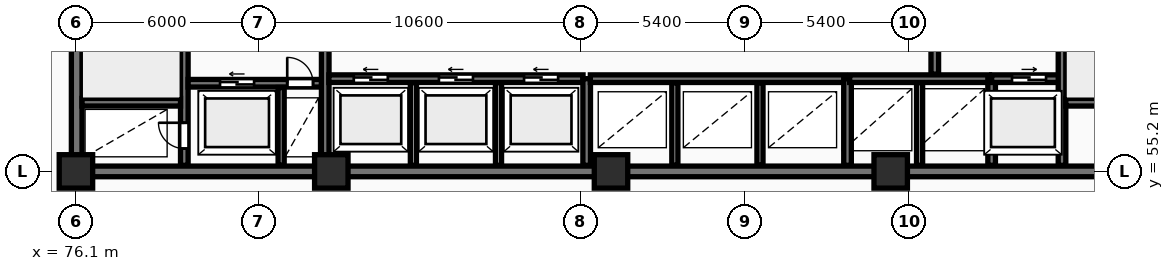
"""IFC4 building model, lengths in metres.
Left out: names, types, materials, properties, quantities, classifications, styles, units other than length and angle.
Written with IfcOpenShell. Run it as: python <this file> out.ifc"""

import sys

from ifc_helpers import new_model, si_unit, direction, frame, frame_2d, origin, origin_2d, place, context, subcontext, project, spatial, rectangle, extrude, element, fill, save


model = new_model("IFC4")
c1 = context("Model", 3, precision=1e-05, world=origin(), true_north=direction((0.0, 1.0)))
c2 = subcontext(c1, "Body", "Model", "MODEL_VIEW")
j1 = project(units=[si_unit("LENGTHUNIT", "METRE"), si_unit("PLANEANGLEUNIT", "RADIAN")], contexts=[c1])
p1 = place(None, origin())
s1 = spatial("IfcSite", under=j1, at=p1, CompositionType="ELEMENT")
p2 = place(p1, origin())
s2 = spatial("IfcBuilding", under=s1, at=p2, CompositionType="ELEMENT")
p3 = place(p2, frame((0.0, 0.0, 19.0)))
s3 = spatial("IfcBuildingStorey", under=s2, at=p3, CompositionType="ELEMENT", Elevation=19.0)
for number, where, z_axis, x_axis in (
    (1, (76.1, 55.2, 0.0), (0.0, 0.0, 1.0), (1.0, 0.0, 0.0)),
    (2, (84.5, 55.2, 0.0), (0.0, 0.0, 1.0), (1.0, 0.0, 0.0)),
    (3, (93.7, 55.2, 0.0), (0.0, 0.0, 1.0), (1.0, 0.0, 0.0)),
    (4, (102.9, 55.2, 0.0), (0.0, 0.0, 1.0), (1.0, 0.0, 0.0)),
):
    element("IfcColumn", number, at=place(p3, frame(where, z_axis=z_axis, x_axis=x_axis)), inside=s3, PredefinedType="COLUMN", context=c2, shape_type="SweptSolid", body=[
        extrude(rectangle(XDim=1.1, YDim=1.1, at=origin_2d()), origin(), (0.0, 0.0, 1.0), 5.0),
    ])
p4 = place(p3, frame((75.95, 55.2, 0.0), z_axis=(0.0, 0.0, 1.0), x_axis=(1.0, 0.0, 0.0)))
e5 = element("IfcWall", 5, at=p4, inside=s3, PredefinedType="SHEAR", context=c2, shape_type="SweptSolid", body=[
    extrude(rectangle(XDim=36.3, YDim=0.35, at=frame_2d((18.15, 0.0))), origin(), (0.0, 0.0, 1.0), 5.0),
])
p5 = place(p3, frame((76.125, 55.375, 0.0), z_axis=(0.0, 0.0, 1.0), x_axis=(0.0, 1.0, 0.0)))
e6 = element("IfcWall", 6, at=p5, inside=s3, PredefinedType="SHEAR", context=c2, shape_type="SweptSolid", body=[
    extrude(rectangle(XDim=11.65, YDim=0.35, at=frame_2d((5.825, 0.0))), origin(), (0.0, 0.0, 1.0), 5.0),
])
p6 = place(p3, frame((79.665, 55.4, 0.0), z_axis=(0.0, 0.0, 1.0), x_axis=(0.0, 1.0, 0.0)))
e7 = element("IfcWall", 7, at=p6, inside=s3, PredefinedType="SHEAR", context=c2, shape_type="SweptSolid", body=[
    extrude(rectangle(XDim=11.6, YDim=0.25, at=frame_2d((5.8, 0.0))), origin(), (0.0, 0.0, 1.0), 5.0),
])
p7 = place(p6, frame((0.55, 0.0, 0.0)))
e8 = element("IfcOpeningElement", 8, at=p7, cuts=e7, PredefinedType="OPENING", context=c2, shape_type="SweptSolid", body=[
    extrude(rectangle(XDim=0.85, YDim=2.05, at=frame_2d((0.425, 1.025))), frame((0.0, 0.135, 0.0), z_axis=(0.0, -1.0, 0.0), x_axis=(1.0, 0.0, 0.0)), (0.0, 0.0, 1.0), 0.27),
])
p8 = place(p6, frame((8.4, 0.0, 0.0)))
e9 = element("IfcOpeningElement", 9, at=p8, cuts=e7, PredefinedType="OPENING", context=c2, shape_type="SweptSolid", body=[
    extrude(rectangle(XDim=1.1, YDim=2.1, at=frame_2d((0.55, 1.05))), frame((0.0, 0.135, 0.0), z_axis=(0.0, -1.0, 0.0), x_axis=(1.0, 0.0, 0.0)), (0.0, 0.0, 1.0), 0.27),
])
p9 = place(p6, frame((10.25, 0.0, 0.0)))
e10 = element("IfcOpeningElement", 10, at=p9, cuts=e7, PredefinedType="OPENING", context=c2, shape_type="SweptSolid", body=[
    extrude(rectangle(XDim=0.85, YDim=2.05, at=frame_2d((0.425, 1.025))), frame((0.0, 0.135, 0.0), z_axis=(0.0, -1.0, 0.0), x_axis=(1.0, 0.0, 0.0)), (0.0, 0.0, 1.0), 0.27),
])
p10 = place(p3, frame((76.3, 57.475, 0.0), z_axis=(0.0, 0.0, 1.0), x_axis=(1.0, 0.0, 0.0)))
e11 = element("IfcWall", 11, at=p10, inside=s3, PredefinedType="SHEAR", context=c2, shape_type="SweptSolid", body=[
    extrude(rectangle(XDim=3.24, YDim=0.25, at=frame_2d((1.62, 0.0))), origin(), (0.0, 0.0, 1.0), 5.0),
])
p11 = place(p3, frame((79.79, 58.1, 0.0), z_axis=(0.0, 0.0, 1.0), x_axis=(1.0, 0.0, 0.0)))
e12 = element("IfcWall", 12, at=p11, inside=s3, PredefinedType="SHEAR", context=c2, shape_type="SweptSolid", body=[
    extrude(rectangle(XDim=4.39, YDim=0.25, at=frame_2d((2.195, 0.0))), origin(), (0.0, 0.0, 1.0), 5.0),
])
p12 = place(p11, frame((1.05, 0.0, 0.0)))
e13 = element("IfcOpeningElement", 13, at=p12, cuts=e12, PredefinedType="OPENING", context=c2, shape_type="SweptSolid", body=[
    extrude(rectangle(XDim=1.12, YDim=2.12, at=frame_2d((0.56, 1.06))), frame((0.0, 0.135, 0.0), z_axis=(0.0, -1.0, 0.0), x_axis=(1.0, 0.0, 0.0)), (0.0, 0.0, 1.0), 0.27),
])
p13 = place(p11, frame((3.26, 0.0, 0.0)))
e14 = element("IfcOpeningElement", 14, at=p13, cuts=e12, PredefinedType="OPENING", context=c2, shape_type="SweptSolid", body=[
    extrude(rectangle(XDim=0.85, YDim=2.05, at=frame_2d((0.425, 1.025))), frame((0.0, 0.135, 0.0), z_axis=(0.0, -1.0, 0.0), x_axis=(1.0, 0.0, 0.0)), (0.0, 0.0, 1.0), 0.27),
])
p14 = place(p3, frame((82.85, 55.4, 0.0), z_axis=(0.0, 0.0, 1.0), x_axis=(0.0, 1.0, 0.0)))
e15 = element("IfcWall", 15, at=p14, inside=s3, PredefinedType="PARTITIONING", context=c2, shape_type="SweptSolid", body=[
    extrude(rectangle(XDim=2.56, YDim=0.2, at=frame_2d((1.28, 0.0))), origin(), (0.0, 0.0, 1.0), 4.68),
])
p15 = place(p3, frame((84.3, 55.4, 0.0), z_axis=(0.0, 0.0, 1.0), x_axis=(0.0, 1.0, 0.0)))
e16 = element("IfcWall", 16, at=p15, inside=s3, PredefinedType="SHEAR", context=c2, shape_type="SweptSolid", body=[
    extrude(rectangle(XDim=11.6, YDim=0.25, at=frame_2d((5.8, 0.0))), origin(), (0.0, 0.0, 1.0), 5.0),
])
p16 = place(p15, frame((5.2, 0.0, 0.0)))
e17 = element("IfcOpeningElement", 17, at=p16, cuts=e16, PredefinedType="OPENING", context=c2, shape_type="SweptSolid", body=[
    extrude(rectangle(XDim=1.1, YDim=2.1, at=frame_2d((0.55, 1.05))), frame((0.0, 0.135, 0.0), z_axis=(0.0, -1.0, 0.0), x_axis=(1.0, 0.0, 0.0)), (0.0, 0.0, 1.0), 0.27),
])
for number, where, z_axis, x_axis in (
    (18, (87.2, 55.4, 0.0), (0.0, 0.0, 1.0), (0.0, 1.0, 0.0)),
    (19, (90.0, 55.4, 0.0), (0.0, 0.0, 1.0), (0.0, 1.0, 0.0)),
):
    element("IfcWall", number, at=place(p3, frame(where, z_axis=z_axis, x_axis=x_axis)), inside=s3, PredefinedType="PARTITIONING", context=c2, shape_type="SweptSolid", body=[
        extrude(rectangle(XDim=2.72, YDim=0.2, at=frame_2d((1.36, 0.0))), origin(), (0.0, 0.0, 1.0), 4.68),
    ])
p17 = place(p3, frame((84.42, 58.25, 0.0), z_axis=(0.0, 0.0, 1.0), x_axis=(1.0, 0.0, 0.0)))
e20 = element("IfcWall", 20, at=p17, inside=s3, PredefinedType="SHEAR", context=c2, shape_type="SweptSolid", body=[
    extrude(rectangle(XDim=8.36, YDim=0.25, at=frame_2d((4.18, 0.0))), origin(), (0.0, 0.0, 1.0), 5.0),
])
p18 = place(p17, frame((0.82, 0.0, 0.0)))
e21 = element("IfcOpeningElement", 21, at=p18, cuts=e20, PredefinedType="OPENING", context=c2, shape_type="SweptSolid", body=[
    extrude(rectangle(XDim=1.12, YDim=2.12, at=frame_2d((0.56, 1.06))), frame((0.0, 0.135, 0.0), z_axis=(0.0, -1.0, 0.0), x_axis=(1.0, 0.0, 0.0)), (0.0, 0.0, 1.0), 0.27),
])
p19 = place(p17, frame((3.62, 0.0, 0.0)))
e22 = element("IfcOpeningElement", 22, at=p19, cuts=e20, PredefinedType="OPENING", context=c2, shape_type="SweptSolid", body=[
    extrude(rectangle(XDim=1.12, YDim=2.12, at=frame_2d((0.56, 1.06))), frame((0.0, 0.135, 0.0), z_axis=(0.0, -1.0, 0.0), x_axis=(1.0, 0.0, 0.0)), (0.0, 0.0, 1.0), 0.27),
])
p20 = place(p17, frame((6.42, 0.0, 0.0)))
e23 = element("IfcOpeningElement", 23, at=p20, cuts=e20, PredefinedType="OPENING", context=c2, shape_type="SweptSolid", body=[
    extrude(rectangle(XDim=1.12, YDim=2.12, at=frame_2d((0.56, 1.06))), frame((0.0, 0.135, 0.0), z_axis=(0.0, -1.0, 0.0), x_axis=(1.0, 0.0, 0.0)), (0.0, 0.0, 1.0), 0.27),
])
p21 = place(p3, frame((92.9, 55.4, 0.0), z_axis=(0.0, 0.0, 1.0), x_axis=(0.0, 1.0, 0.0)))
e24 = element("IfcWall", 24, at=p21, inside=s3, PredefinedType="SHEAR", context=c2, shape_type="SweptSolid", body=[
    extrude(rectangle(XDim=2.85, YDim=0.25, at=frame_2d((1.425, 0.0))), origin(), (0.0, 0.0, 1.0), 5.0),
])
for number, where, z_axis, x_axis in (
    (25, (95.8, 55.4, 0.0), (0.0, 0.0, 1.0), (0.0, 1.0, 0.0)),
    (26, (98.6, 55.4, 0.0), (0.0, 0.0, 1.0), (0.0, 1.0, 0.0)),
):
    element("IfcWall", number, at=place(p3, frame(where, z_axis=z_axis, x_axis=x_axis)), inside=s3, PredefinedType="PARTITIONING", context=c2, shape_type="SweptSolid", body=[
        extrude(rectangle(XDim=2.72, YDim=0.2, at=frame_2d((1.36, 0.0))), origin(), (0.0, 0.0, 1.0), 4.68),
    ])
p22 = place(p3, frame((93.02, 58.25, 0.0), z_axis=(0.0, 0.0, 1.0), x_axis=(1.0, 0.0, 0.0)))
e27 = element("IfcWall", 27, at=p22, inside=s3, PredefinedType="SHEAR", context=c2, shape_type="SweptSolid", body=[
    extrude(rectangle(XDim=8.36, YDim=0.25, at=frame_2d((4.18, 0.0))), origin(), (0.0, 0.0, 1.0), 5.0),
])
p23 = place(p3, frame((101.48, 55.4, 0.0), z_axis=(0.0, 0.0, 1.0), x_axis=(0.0, 1.0, 0.0)))
e28 = element("IfcWall", 28, at=p23, inside=s3, PredefinedType="SHEAR", context=c2, shape_type="SweptSolid", body=[
    extrude(rectangle(XDim=2.85, YDim=0.25, at=frame_2d((1.425, 0.0))), origin(), (0.0, 0.0, 1.0), 5.0),
])
p24 = place(p3, frame((103.85, 55.4, 0.0), z_axis=(0.0, 0.0, 1.0), x_axis=(0.0, 1.0, 0.0)))
e29 = element("IfcWall", 29, at=p24, inside=s3, PredefinedType="PARTITIONING", context=c2, shape_type="SweptSolid", body=[
    extrude(rectangle(XDim=2.72, YDim=0.2, at=frame_2d((1.36, 0.0))), origin(), (0.0, 0.0, 1.0), 4.68),
])
p25 = place(p3, frame((101.55, 58.25, 0.0), z_axis=(0.0, 0.0, 1.0), x_axis=(1.0, 0.0, 0.0)))
e30 = element("IfcWall", 30, at=p25, inside=s3, PredefinedType="SHEAR", context=c2, shape_type="SweptSolid", body=[
    extrude(rectangle(XDim=4.6, YDim=0.25, at=frame_2d((2.3, 0.0))), origin(), (0.0, 0.0, 1.0), 5.0),
])
p26 = place(p3, frame((106.22, 55.4, 0.0), z_axis=(0.0, 0.0, 1.0), x_axis=(0.0, 1.0, 0.0)))
e31 = element("IfcWall", 31, at=p26, inside=s3, PredefinedType="SHEAR", context=c2, shape_type="SweptSolid", body=[
    extrude(rectangle(XDim=2.85, YDim=0.25, at=frame_2d((1.425, 0.0))), origin(), (0.0, 0.0, 1.0), 5.0),
])
p27 = place(p3, frame((106.22, 58.25, 0.0), z_axis=(0.0, 0.0, 1.0), x_axis=(1.0, 0.0, 0.0)))
e32 = element("IfcWall", 32, at=p27, inside=s3, PredefinedType="SHEAR", context=c2, shape_type="SweptSolid", body=[
    extrude(rectangle(XDim=2.46, YDim=0.25, at=frame_2d((1.23, 0.0))), origin(), (0.0, 0.0, 1.0), 5.0),
])
p28 = place(p27, frame((0.67, 0.0, 0.0)))
e33 = element("IfcOpeningElement", 33, at=p28, cuts=e32, PredefinedType="OPENING", context=c2, shape_type="SweptSolid", body=[
    extrude(rectangle(XDim=1.12, YDim=2.12, at=frame_2d((0.56, 1.06))), frame((0.0, 0.135, 0.0), z_axis=(0.0, -1.0, 0.0), x_axis=(1.0, 0.0, 0.0)), (0.0, 0.0, 1.0), 0.27),
])
p29 = place(p3, frame((104.35, 58.4, 0.0), z_axis=(0.0, 0.0, 1.0), x_axis=(0.0, 1.0, 0.0)))
e34 = element("IfcWall", 34, at=p29, inside=s3, PredefinedType="SHEAR", context=c2, shape_type="SweptSolid", body=[
    extrude(rectangle(XDim=8.6, YDim=0.25, at=frame_2d((4.3, 0.0))), origin(), (0.0, 0.0, 1.0), 5.0),
])
p30 = place(p29, frame((1.8, 0.0, 0.0)))
e35 = element("IfcOpeningElement", 35, at=p30, cuts=e34, PredefinedType="OPENING", context=c2, shape_type="SweptSolid", body=[
    extrude(rectangle(XDim=1.1, YDim=2.1, at=frame_2d((0.55, 1.05))), frame((0.0, 0.135, 0.0), z_axis=(0.0, -1.0, 0.0), x_axis=(1.0, 0.0, 0.0)), (0.0, 0.0, 1.0), 0.27),
])
p31 = place(p3, frame((108.535, 55.4, 0.0), z_axis=(0.0, 0.0, 1.0), x_axis=(0.0, 1.0, 0.0)))
e36 = element("IfcWall", 36, at=p31, inside=s3, PredefinedType="SHEAR", context=c2, shape_type="SweptSolid", body=[
    extrude(rectangle(XDim=11.6, YDim=0.25, at=frame_2d((5.8, 0.0))), origin(), (0.0, 0.0, 1.0), 5.0),
])
p32 = place(p31, frame((8.2, 0.0, 0.0)))
e37 = element("IfcOpeningElement", 37, at=p32, cuts=e36, PredefinedType="OPENING", context=c2, shape_type="SweptSolid", body=[
    extrude(rectangle(XDim=1.1, YDim=2.1, at=frame_2d((0.55, 1.05))), frame((0.0, 0.135, 0.0), z_axis=(0.0, -1.0, 0.0), x_axis=(1.0, 0.0, 0.0)), (0.0, 0.0, 1.0), 0.27),
])
p33 = place(p31, frame((10.25, 0.0, 0.0)))
e38 = element("IfcOpeningElement", 38, at=p33, cuts=e36, PredefinedType="OPENING", context=c2, shape_type="SweptSolid", body=[
    extrude(rectangle(XDim=0.85, YDim=2.05, at=frame_2d((0.425, 1.025))), frame((0.0, 0.135, 0.0), z_axis=(0.0, -1.0, 0.0), x_axis=(1.0, 0.0, 0.0)), (0.0, 0.0, 1.0), 0.27),
])
p34 = place(p3, frame((108.66, 57.475, 0.0), z_axis=(0.0, 0.0, 1.0), x_axis=(1.0, 0.0, 0.0)))
e39 = element("IfcWall", 39, at=p34, inside=s3, PredefinedType="SHEAR", context=c2, shape_type="SweptSolid", body=[
    extrude(rectangle(XDim=3.24, YDim=0.25, at=frame_2d((1.62, 0.0))), origin(), (0.0, 0.0, 1.0), 5.0),
])
p35 = place(p7, origin())
e40 = element("IfcDoor", 40, at=p35, inside=s3, OperationType="SINGLE_SWING_RIGHT", PredefinedType="DOOR", context=c2, shape_type="SweptSolid", body=[
    extrude(rectangle(XDim=0.85, YDim=2.05, at=frame_2d((0.425, 1.025))), frame((0.0, 0.025, 0.0), z_axis=(0.0, -1.0, 0.0), x_axis=(1.0, 0.0, 0.0)), (0.0, 0.0, 1.0), 0.05),
])
fill(e8, e40)
p36 = place(p12, origin())
e41 = element("IfcDoor", 41, at=p36, inside=s3, OperationType="SLIDING_TO_LEFT", PredefinedType="DOOR", context=c2, shape_type="SweptSolid", body=[
    extrude(rectangle(XDim=1.12, YDim=2.12, at=frame_2d((0.56, 1.06))), frame((0.0, 0.025, 0.0), z_axis=(0.0, -1.0, 0.0), x_axis=(1.0, 0.0, 0.0)), (0.0, 0.0, 1.0), 0.05),
])
fill(e13, e41)
p37 = place(p13, origin())
e42 = element("IfcDoor", 42, at=p37, inside=s3, OperationType="SINGLE_SWING_LEFT", PredefinedType="DOOR", context=c2, shape_type="SweptSolid", body=[
    extrude(rectangle(XDim=0.85, YDim=2.05, at=frame_2d((0.425, 1.025))), frame((0.0, 0.025, 0.0), z_axis=(0.0, -1.0, 0.0), x_axis=(1.0, 0.0, 0.0)), (0.0, 0.0, 1.0), 0.05),
])
fill(e14, e42)
p38 = place(p18, origin())
e43 = element("IfcDoor", 43, at=p38, inside=s3, OperationType="SLIDING_TO_LEFT", PredefinedType="DOOR", context=c2, shape_type="SweptSolid", body=[
    extrude(rectangle(XDim=1.12, YDim=2.12, at=frame_2d((0.56, 1.06))), frame((0.0, 0.025, 0.0), z_axis=(0.0, -1.0, 0.0), x_axis=(1.0, 0.0, 0.0)), (0.0, 0.0, 1.0), 0.05),
])
fill(e21, e43)
p39 = place(p19, origin())
e44 = element("IfcDoor", 44, at=p39, inside=s3, OperationType="SLIDING_TO_LEFT", PredefinedType="DOOR", context=c2, shape_type="SweptSolid", body=[
    extrude(rectangle(XDim=1.12, YDim=2.12, at=frame_2d((0.56, 1.06))), frame((0.0, 0.025, 0.0), z_axis=(0.0, -1.0, 0.0), x_axis=(1.0, 0.0, 0.0)), (0.0, 0.0, 1.0), 0.05),
])
fill(e22, e44)
p40 = place(p20, origin())
e45 = element("IfcDoor", 45, at=p40, inside=s3, OperationType="SLIDING_TO_LEFT", PredefinedType="DOOR", context=c2, shape_type="SweptSolid", body=[
    extrude(rectangle(XDim=1.12, YDim=2.12, at=frame_2d((0.56, 1.06))), frame((0.0, 0.025, 0.0), z_axis=(0.0, -1.0, 0.0), x_axis=(1.0, 0.0, 0.0)), (0.0, 0.0, 1.0), 0.05),
])
fill(e23, e45)
p41 = place(p28, origin())
e46 = element("IfcDoor", 46, at=p41, inside=s3, OperationType="SLIDING_TO_RIGHT", PredefinedType="DOOR", context=c2, shape_type="SweptSolid", body=[
    extrude(rectangle(XDim=1.12, YDim=2.12, at=frame_2d((0.56, 1.06))), frame((0.0, 0.025, 0.0), z_axis=(0.0, -1.0, 0.0), x_axis=(1.0, 0.0, 0.0)), (0.0, 0.0, 1.0), 0.05),
])
fill(e33, e46)
save(model, sys.argv[1])
